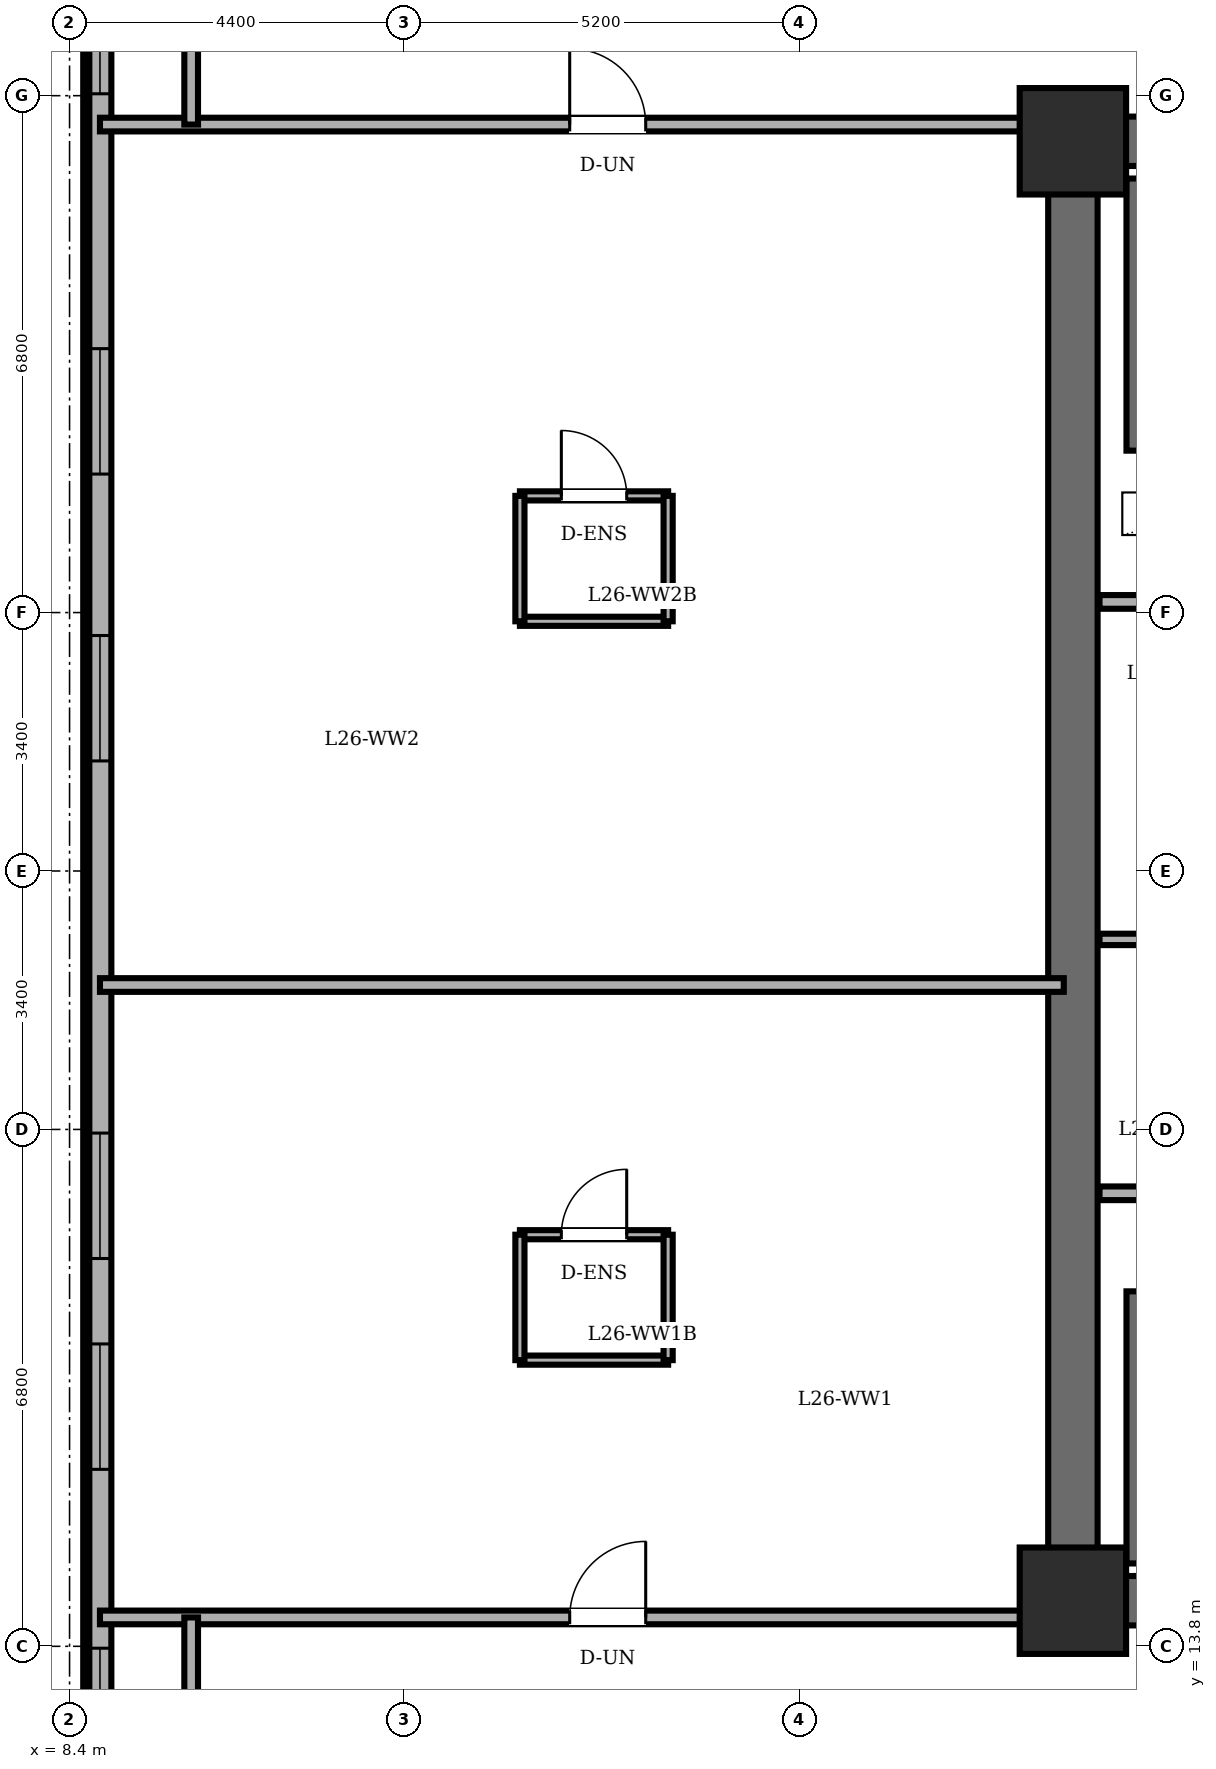
"""IFC4 building model, lengths in metres.
Left out: names, types, materials, properties, quantities, classifications, styles, units other than length and angle.
Written with IfcOpenShell. Run it as: python <this file> out.ifc"""

import sys

from ifc_helpers import new_model, si_unit, direction, frame, frame_2d, origin, origin_2d, place, context, subcontext, project, spatial, rectangle, extrude, element, fill, save


model = new_model("IFC4")
c1 = context("Model", 3, precision=1e-05, world=origin(), true_north=direction((0.0, 1.0)))
c2 = subcontext(c1, "Body", "Model", "MODEL_VIEW")
j1 = project(units=[si_unit("LENGTHUNIT", "METRE"), si_unit("PLANEANGLEUNIT", "RADIAN")], contexts=[c1])
p1 = place(None, origin())
s1 = spatial("IfcSite", under=j1, at=p1, CompositionType="ELEMENT")
p2 = place(p1, origin())
s2 = spatial("IfcBuilding", under=s1, at=p2, CompositionType="ELEMENT")
p3 = place(p2, frame((0.0, 0.0, 100.7)))
s3 = spatial("IfcBuildingStorey", under=s2, at=p3, CompositionType="ELEMENT", Elevation=100.7)
for number, where, z_axis, x_axis in (
    (1, (21.6, 14.4, 0.0), (0.0, 0.0, 1.0), (1.0, 0.0, 0.0)),
    (2, (21.6, 33.6, 0.0), (0.0, 0.0, 1.0), (1.0, 0.0, 0.0)),
):
    element("IfcColumn", number, at=place(p3, frame(where, z_axis=z_axis, x_axis=x_axis)), inside=s3, PredefinedType="COLUMN", context=c2, shape_type="SweptSolid", body=[
        extrude(rectangle(XDim=1.4, YDim=1.4, at=origin_2d()), origin(), (0.0, 0.0, 1.0), 3.6),
    ])
p4 = place(p3, frame((8.8, 38.2, 0.0), z_axis=(0.0, 0.0, 1.0), x_axis=(0.0, -1.0, 0.0)))
e3 = element("IfcWall", 3, at=p4, inside=s3, PredefinedType="SOLIDWALL", context=c2, shape_type="SweptSolid", body=[
    extrude(rectangle(XDim=28.4, YDim=0.3, at=frame_2d((14.2, 0.0))), origin(), (0.0, 0.0, 1.0), 3.4),
])
p5 = place(p4, frame((2.325, 0.0, 0.85)))
e4 = element("IfcOpeningElement", 4, at=p5, cuts=e3, PredefinedType="OPENING", context=c2, shape_type="SweptSolid", body=[
    extrude(rectangle(XDim=1.65, YDim=1.55, at=frame_2d((0.825, 0.775))), frame((0.0, 0.16, 0.0), z_axis=(0.0, -1.0, 0.0), x_axis=(1.0, 0.0, 0.0)), (0.0, 0.0, 1.0), 0.32),
])
p6 = place(p4, frame((7.328, 0.0, 0.85)))
e5 = element("IfcOpeningElement", 5, at=p6, cuts=e3, PredefinedType="OPENING", context=c2, shape_type="SweptSolid", body=[
    extrude(rectangle(XDim=1.65, YDim=1.55, at=frame_2d((0.825, 0.775))), frame((0.0, 0.16, 0.0), z_axis=(0.0, -1.0, 0.0), x_axis=(1.0, 0.0, 0.0)), (0.0, 0.0, 1.0), 0.32),
])
p7 = place(p4, frame((11.102, 0.0, 0.85)))
e6 = element("IfcOpeningElement", 6, at=p7, cuts=e3, PredefinedType="OPENING", context=c2, shape_type="SweptSolid", body=[
    extrude(rectangle(XDim=1.65, YDim=1.55, at=frame_2d((0.825, 0.775))), frame((0.0, 0.16, 0.0), z_axis=(0.0, -1.0, 0.0), x_axis=(1.0, 0.0, 0.0)), (0.0, 0.0, 1.0), 0.32),
])
p8 = place(p4, frame((17.648, 0.0, 0.85)))
e7 = element("IfcOpeningElement", 7, at=p8, cuts=e3, PredefinedType="OPENING", context=c2, shape_type="SweptSolid", body=[
    extrude(rectangle(XDim=1.65, YDim=1.55, at=frame_2d((0.825, 0.775))), frame((0.0, 0.16, 0.0), z_axis=(0.0, -1.0, 0.0), x_axis=(1.0, 0.0, 0.0)), (0.0, 0.0, 1.0), 0.32),
])
p9 = place(p4, frame((20.422, 0.0, 0.85)))
e8 = element("IfcOpeningElement", 8, at=p9, cuts=e3, PredefinedType="OPENING", context=c2, shape_type="SweptSolid", body=[
    extrude(rectangle(XDim=1.65, YDim=1.55, at=frame_2d((0.825, 0.775))), frame((0.0, 0.16, 0.0), z_axis=(0.0, -1.0, 0.0), x_axis=(1.0, 0.0, 0.0)), (0.0, 0.0, 1.0), 0.32),
])
p10 = place(p4, frame((24.425, 0.0, 0.85)))
e9 = element("IfcOpeningElement", 9, at=p10, cuts=e3, PredefinedType="OPENING", context=c2, shape_type="SweptSolid", body=[
    extrude(rectangle(XDim=1.65, YDim=1.55, at=frame_2d((0.825, 0.775))), frame((0.0, 0.16, 0.0), z_axis=(0.0, -1.0, 0.0), x_axis=(1.0, 0.0, 0.0)), (0.0, 0.0, 1.0), 0.32),
])
p11 = place(p3, frame((21.6, 14.4, 0.0), z_axis=(0.0, 0.0, 1.0), x_axis=(0.0, 1.0, 0.0)))
e10 = element("IfcWall", 10, at=p11, inside=s3, PredefinedType="SHEAR", context=c2, shape_type="SweptSolid", body=[
    extrude(rectangle(XDim=19.2, YDim=0.65, at=frame_2d((9.6, 0.0))), origin(), (0.0, 0.0, 1.0), 3.4),
])
for number, where, z_axis, x_axis in (
    (11, (21.6, 33.6, 0.0), (0.0, 0.0, 1.0), (1.0, 0.0, 0.0)),
    (12, (37.2, 14.4, 0.0), (0.0, 0.0, 1.0), (-1.0, 0.0, 0.0)),
):
    element("IfcWall", number, at=place(p3, frame(where, z_axis=z_axis, x_axis=x_axis)), inside=s3, PredefinedType="SHEAR", context=c2, shape_type="SweptSolid", body=[
        extrude(rectangle(XDim=15.6, YDim=0.65, at=frame_2d((7.8, 0.0))), origin(), (0.0, 0.0, 1.0), 3.4),
    ])
for number, where, z_axis, x_axis in (
    (13, (22.48, 29.53, 0.0), (0.0, 0.0, 1.0), (0.0, 1.0, 0.0)),
    (14, (22.48, 14.89, 0.0), (0.0, 0.0, 1.0), (0.0, 1.0, 0.0)),
):
    element("IfcWall", number, at=place(p3, frame(where, z_axis=z_axis, x_axis=x_axis)), inside=s3, PredefinedType="SOLIDWALL", context=c2, shape_type="SweptSolid", body=[
        extrude(rectangle(XDim=3.58, YDim=0.35, at=frame_2d((1.79, 0.0))), origin(), (0.0, 0.0, 1.0), 3.4),
    ])
p12 = place(p3, frame((21.95, 27.54, 0.0), z_axis=(0.0, 0.0, 1.0), x_axis=(1.0, 0.0, 0.0)))
e15 = element("IfcWall", 15, at=p12, inside=s3, PredefinedType="PARTITIONING", context=c2, shape_type="SweptSolid", body=[
    extrude(rectangle(XDim=10.56, YDim=0.18, at=frame_2d((5.28, 0.0))), origin(), (0.0, 0.0, 1.0), 3.4),
])
p13 = place(p3, frame((21.95, 19.76, 0.0), z_axis=(0.0, 0.0, 1.0), x_axis=(1.0, 0.0, 0.0)))
e16 = element("IfcWall", 16, at=p13, inside=s3, PredefinedType="PARTITIONING", context=c2, shape_type="SweptSolid", body=[
    extrude(rectangle(XDim=14.87, YDim=0.18, at=frame_2d((7.435, 0.0))), origin(), (0.0, 0.0, 1.0), 3.4),
])
p14 = place(p3, frame((21.95, 23.1, 0.0), z_axis=(0.0, 0.0, 1.0), x_axis=(1.0, 0.0, 0.0)))
e17 = element("IfcWall", 17, at=p14, inside=s3, PredefinedType="PARTITIONING", context=c2, shape_type="SweptSolid", body=[
    extrude(rectangle(XDim=2.51, YDim=0.15, at=frame_2d((1.255, 0.0))), origin(), (0.0, 0.0, 1.0), 3.4),
])
p15 = place(p3, frame((14.325, 19.215, 0.0), z_axis=(0.0, 0.0, 1.0), x_axis=(1.0, 0.0, 0.0)))
e18 = element("IfcWall", 18, at=p15, inside=s3, PredefinedType="PARTITIONING", context=c2, shape_type="SweptSolid", body=[
    extrude(rectangle(XDim=1.95, YDim=0.12, at=frame_2d((0.975, 0.0))), origin(), (0.0, 0.0, 1.0), 3.4),
])
p16 = place(p15, frame((0.545, 0.0, 0.0)))
e19 = element("IfcOpeningElement", 19, at=p16, cuts=e18, PredefinedType="OPENING", context=c2, shape_type="SweptSolid", body=[
    extrude(rectangle(XDim=0.86, YDim=2.1, at=frame_2d((0.43, 1.05))), frame((0.0, 0.07, 0.0), z_axis=(0.0, -1.0, 0.0), x_axis=(1.0, 0.0, 0.0)), (0.0, 0.0, 1.0), 0.14),
])
p17 = place(p3, frame((16.275, 17.565, 0.0), z_axis=(0.0, 0.0, 1.0), x_axis=(-1.0, 0.0, 0.0)))
e20 = element("IfcWall", 20, at=p17, inside=s3, PredefinedType="PARTITIONING", context=c2, shape_type="SweptSolid", body=[
    extrude(rectangle(XDim=1.95, YDim=0.12, at=frame_2d((0.975, 0.0))), origin(), (0.0, 0.0, 1.0), 3.4),
])
for number, where, z_axis, x_axis in (
    (21, (14.325, 19.215, 0.0), (0.0, 0.0, 1.0), (0.0, -1.0, 0.0)),
    (22, (16.275, 17.565, 0.0), (0.0, 0.0, 1.0), (0.0, 1.0, 0.0)),
):
    element("IfcWall", number, at=place(p3, frame(where, z_axis=z_axis, x_axis=x_axis)), inside=s3, PredefinedType="PARTITIONING", context=c2, shape_type="SweptSolid", body=[
        extrude(rectangle(XDim=1.65, YDim=0.12, at=frame_2d((0.825, 0.0))), origin(), (0.0, 0.0, 1.0), 3.4),
    ])
p18 = place(p3, frame((14.325, 28.935, 0.0), z_axis=(0.0, 0.0, 1.0), x_axis=(1.0, 0.0, 0.0)))
e23 = element("IfcWall", 23, at=p18, inside=s3, PredefinedType="PARTITIONING", context=c2, shape_type="SweptSolid", body=[
    extrude(rectangle(XDim=1.95, YDim=0.12, at=frame_2d((0.975, 0.0))), origin(), (0.0, 0.0, 1.0), 3.4),
])
p19 = place(p18, frame((0.545, 0.0, 0.0)))
e24 = element("IfcOpeningElement", 24, at=p19, cuts=e23, PredefinedType="OPENING", context=c2, shape_type="SweptSolid", body=[
    extrude(rectangle(XDim=0.86, YDim=2.1, at=frame_2d((0.43, 1.05))), frame((0.0, 0.07, 0.0), z_axis=(0.0, -1.0, 0.0), x_axis=(1.0, 0.0, 0.0)), (0.0, 0.0, 1.0), 0.14),
])
p20 = place(p3, frame((16.275, 27.285, 0.0), z_axis=(0.0, 0.0, 1.0), x_axis=(-1.0, 0.0, 0.0)))
e25 = element("IfcWall", 25, at=p20, inside=s3, PredefinedType="PARTITIONING", context=c2, shape_type="SweptSolid", body=[
    extrude(rectangle(XDim=1.95, YDim=0.12, at=frame_2d((0.975, 0.0))), origin(), (0.0, 0.0, 1.0), 3.4),
])
for number, where, z_axis, x_axis in (
    (26, (14.325, 28.935, 0.0), (0.0, 0.0, 1.0), (0.0, -1.0, 0.0)),
    (27, (16.275, 27.285, 0.0), (0.0, 0.0, 1.0), (0.0, 1.0, 0.0)),
):
    element("IfcWall", number, at=place(p3, frame(where, z_axis=z_axis, x_axis=x_axis)), inside=s3, PredefinedType="PARTITIONING", context=c2, shape_type="SweptSolid", body=[
        extrude(rectangle(XDim=1.65, YDim=0.12, at=frame_2d((0.825, 0.0))), origin(), (0.0, 0.0, 1.0), 3.4),
    ])
p21 = place(p3, frame((8.8, 14.18, 0.0), z_axis=(0.0, 0.0, 1.0), x_axis=(1.0, 0.0, 0.0)))
e28 = element("IfcWall", 28, at=p21, inside=s3, PredefinedType="PARTITIONING", context=c2, shape_type="SweptSolid", body=[
    extrude(rectangle(XDim=12.68, YDim=0.18, at=frame_2d((6.34, 0.0))), origin(), (0.0, 0.0, 1.0), 3.4),
])
p22 = place(p21, frame((6.18, 0.0, 0.0)))
e29 = element("IfcOpeningElement", 29, at=p22, cuts=e28, PredefinedType="OPENING", context=c2, shape_type="SweptSolid", body=[
    extrude(rectangle(XDim=1.0, YDim=2.15, at=frame_2d((0.5, 1.075))), frame((0.0, 0.1, 0.0), z_axis=(0.0, -1.0, 0.0), x_axis=(1.0, 0.0, 0.0)), (0.0, 0.0, 1.0), 0.2),
])
p23 = place(p3, frame((8.8, 22.5, 0.0), z_axis=(0.0, 0.0, 1.0), x_axis=(1.0, 0.0, 0.0)))
e30 = element("IfcWall", 30, at=p23, inside=s3, PredefinedType="PARTITIONING", context=c2, shape_type="SweptSolid", body=[
    extrude(rectangle(XDim=12.68, YDim=0.18, at=frame_2d((6.34, 0.0))), origin(), (0.0, 0.0, 1.0), 3.4),
])
p24 = place(p3, frame((8.8, 33.82, 0.0), z_axis=(0.0, 0.0, 1.0), x_axis=(1.0, 0.0, 0.0)))
e31 = element("IfcWall", 31, at=p24, inside=s3, PredefinedType="PARTITIONING", context=c2, shape_type="SweptSolid", body=[
    extrude(rectangle(XDim=12.68, YDim=0.18, at=frame_2d((6.34, 0.0))), origin(), (0.0, 0.0, 1.0), 3.4),
])
p25 = place(p24, frame((6.18, 0.0, 0.0)))
e32 = element("IfcOpeningElement", 32, at=p25, cuts=e31, PredefinedType="OPENING", context=c2, shape_type="SweptSolid", body=[
    extrude(rectangle(XDim=1.0, YDim=2.15, at=frame_2d((0.5, 1.075))), frame((0.0, 0.1, 0.0), z_axis=(0.0, -1.0, 0.0), x_axis=(1.0, 0.0, 0.0)), (0.0, 0.0, 1.0), 0.2),
])
for number, where, z_axis, x_axis in (
    (33, (10.0, 11.72, 0.0), (0.0, 0.0, 1.0), (0.0, 1.0, 0.0)),
    (34, (10.0, 33.82, 0.0), (0.0, 0.0, 1.0), (0.0, 1.0, 0.0)),
):
    element("IfcWall", number, at=place(p3, frame(where, z_axis=z_axis, x_axis=x_axis)), inside=s3, PredefinedType="PARTITIONING", context=c2, shape_type="SweptSolid", body=[
        extrude(rectangle(XDim=2.46, YDim=0.18, at=frame_2d((1.23, 0.0))), origin(), (0.0, 0.0, 1.0), 3.4),
    ])
p26 = place(p5, origin())
e35 = element("IfcWindow", 35, at=p26, inside=s3, PartitioningType="DOUBLE_PANEL_VERTICAL", PredefinedType="WINDOW", context=c2, shape_type="SweptSolid", body=[
    extrude(rectangle(XDim=1.65, YDim=1.55, at=frame_2d((0.825, 0.775))), frame((0.0, 0.03, 0.0), z_axis=(0.0, -1.0, 0.0), x_axis=(1.0, 0.0, 0.0)), (0.0, 0.0, 1.0), 0.06),
])
fill(e4, e35)
p27 = place(p6, origin())
e36 = element("IfcWindow", 36, at=p27, inside=s3, PartitioningType="DOUBLE_PANEL_VERTICAL", PredefinedType="WINDOW", context=c2, shape_type="SweptSolid", body=[
    extrude(rectangle(XDim=1.65, YDim=1.55, at=frame_2d((0.825, 0.775))), frame((0.0, 0.03, 0.0), z_axis=(0.0, -1.0, 0.0), x_axis=(1.0, 0.0, 0.0)), (0.0, 0.0, 1.0), 0.06),
])
fill(e5, e36)
p28 = place(p7, origin())
e37 = element("IfcWindow", 37, at=p28, inside=s3, PartitioningType="DOUBLE_PANEL_VERTICAL", PredefinedType="WINDOW", context=c2, shape_type="SweptSolid", body=[
    extrude(rectangle(XDim=1.65, YDim=1.55, at=frame_2d((0.825, 0.775))), frame((0.0, 0.03, 0.0), z_axis=(0.0, -1.0, 0.0), x_axis=(1.0, 0.0, 0.0)), (0.0, 0.0, 1.0), 0.06),
])
fill(e6, e37)
p29 = place(p8, origin())
e38 = element("IfcWindow", 38, at=p29, inside=s3, PartitioningType="DOUBLE_PANEL_VERTICAL", PredefinedType="WINDOW", context=c2, shape_type="SweptSolid", body=[
    extrude(rectangle(XDim=1.65, YDim=1.55, at=frame_2d((0.825, 0.775))), frame((0.0, 0.03, 0.0), z_axis=(0.0, -1.0, 0.0), x_axis=(1.0, 0.0, 0.0)), (0.0, 0.0, 1.0), 0.06),
])
fill(e7, e38)
p30 = place(p9, origin())
e39 = element("IfcWindow", 39, at=p30, inside=s3, PartitioningType="DOUBLE_PANEL_VERTICAL", PredefinedType="WINDOW", context=c2, shape_type="SweptSolid", body=[
    extrude(rectangle(XDim=1.65, YDim=1.55, at=frame_2d((0.825, 0.775))), frame((0.0, 0.03, 0.0), z_axis=(0.0, -1.0, 0.0), x_axis=(1.0, 0.0, 0.0)), (0.0, 0.0, 1.0), 0.06),
])
fill(e8, e39)
p31 = place(p10, origin())
e40 = element("IfcWindow", 40, at=p31, inside=s3, PartitioningType="DOUBLE_PANEL_VERTICAL", PredefinedType="WINDOW", context=c2, shape_type="SweptSolid", body=[
    extrude(rectangle(XDim=1.65, YDim=1.55, at=frame_2d((0.825, 0.775))), frame((0.0, 0.03, 0.0), z_axis=(0.0, -1.0, 0.0), x_axis=(1.0, 0.0, 0.0)), (0.0, 0.0, 1.0), 0.06),
])
fill(e9, e40)
p32 = place(p16, origin())
e41 = element("IfcDoor", 41, at=p32, inside=s3, OperationType="SINGLE_SWING_RIGHT", PredefinedType="DOOR", context=c2, shape_type="SweptSolid", body=[
    extrude(rectangle(XDim=0.86, YDim=2.1, at=frame_2d((0.43, 1.05))), frame((0.0, 0.025, 0.0), z_axis=(0.0, -1.0, 0.0), x_axis=(1.0, 0.0, 0.0)), (0.0, 0.0, 1.0), 0.05),
])
fill(e19, e41)
p33 = place(p19, origin())
e42 = element("IfcDoor", 42, at=p33, inside=s3, OperationType="SINGLE_SWING_LEFT", PredefinedType="DOOR", context=c2, shape_type="SweptSolid", body=[
    extrude(rectangle(XDim=0.86, YDim=2.1, at=frame_2d((0.43, 1.05))), frame((0.0, 0.025, 0.0), z_axis=(0.0, -1.0, 0.0), x_axis=(1.0, 0.0, 0.0)), (0.0, 0.0, 1.0), 0.05),
])
fill(e24, e42)
p34 = place(p22, origin())
e43 = element("IfcDoor", 43, at=p34, inside=s3, OperationType="SINGLE_SWING_RIGHT", PredefinedType="DOOR", context=c2, shape_type="SweptSolid", body=[
    extrude(rectangle(XDim=1.0, YDim=2.15, at=frame_2d((0.5, 1.075))), frame((0.0, 0.025, 0.0), z_axis=(0.0, -1.0, 0.0), x_axis=(1.0, 0.0, 0.0)), (0.0, 0.0, 1.0), 0.05),
])
fill(e29, e43)
p35 = place(p25, origin())
e44 = element("IfcDoor", 44, at=p35, inside=s3, OperationType="SINGLE_SWING_LEFT", PredefinedType="DOOR", context=c2, shape_type="SweptSolid", body=[
    extrude(rectangle(XDim=1.0, YDim=2.15, at=frame_2d((0.5, 1.075))), frame((0.0, 0.025, 0.0), z_axis=(0.0, -1.0, 0.0), x_axis=(1.0, 0.0, 0.0)), (0.0, 0.0, 1.0), 0.05),
])
fill(e32, e44)
save(model, sys.argv[1])
